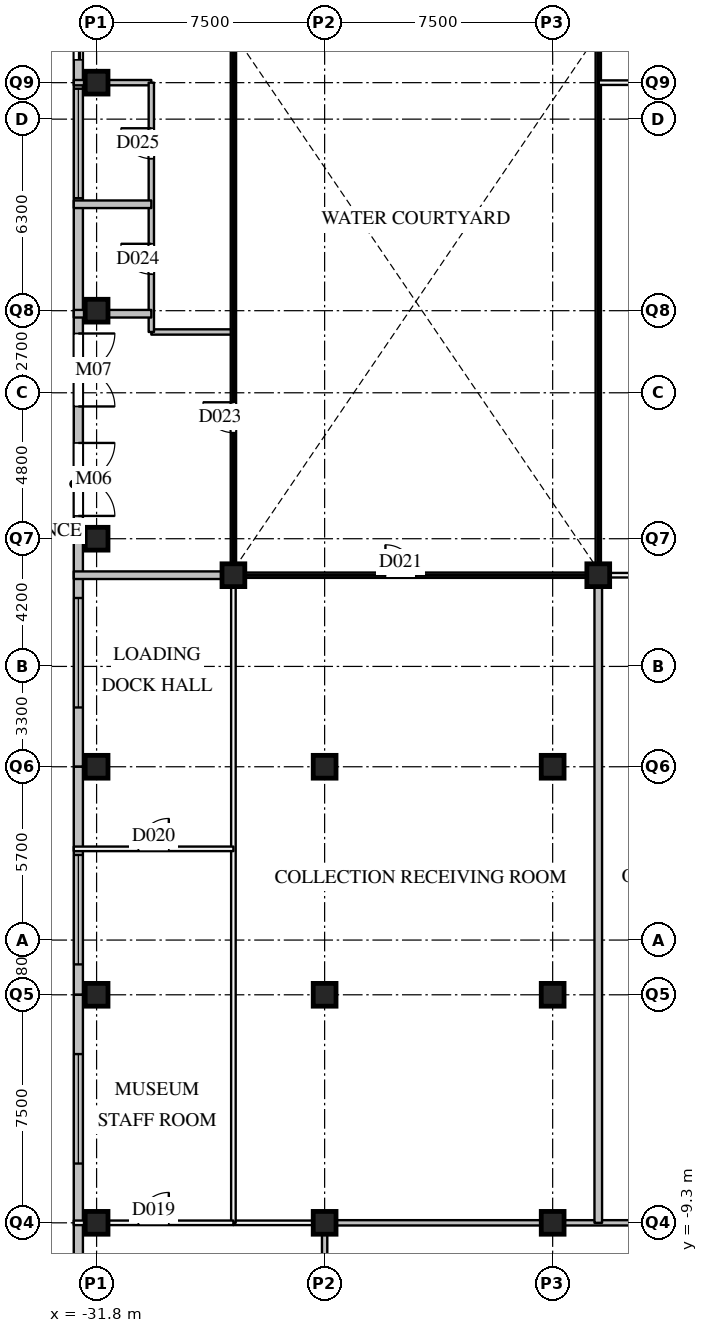
"""IFC4 building model, lengths in metres.
Left out: names, types, materials, properties, quantities, classifications, styles, units other than length and angle.
Written with IfcOpenShell. Run it as: python <this file> out.ifc"""

import sys

from ifc_helpers import new_model, si_unit, direction, frame, frame_2d, origin, origin_2d, place, context, subcontext, project, spatial, rectangle, extrude, element, fill, save


model = new_model("IFC4")
c1 = context("Model", 3, precision=1e-05, world=origin(), true_north=direction((0.0, 1.0)))
c2 = subcontext(c1, "Body", "Model", "MODEL_VIEW")
j1 = project(units=[si_unit("LENGTHUNIT", "METRE"), si_unit("PLANEANGLEUNIT", "RADIAN")], contexts=[c1])
p1 = place(None, origin())
s1 = spatial("IfcSite", under=j1, at=p1, CompositionType="ELEMENT")
p2 = place(p1, origin())
s2 = spatial("IfcBuilding", under=s1, at=p2, CompositionType="ELEMENT")
p3 = place(p2, origin())
s3 = spatial("IfcBuildingStorey", under=s2, at=p3, CompositionType="ELEMENT", Elevation=0.0)
for number, where, z_axis, x_axis in (
    (1, (-31.8, -9.3, 0.0), (0.0, 0.0, 1.0), (1.0, 0.0, 0.0)),
    (2, (-31.8, -1.8, 0.0), (0.0, 0.0, 1.0), (1.0, 0.0, 0.0)),
    (3, (-31.8, 5.7, 0.0), (0.0, 0.0, 1.0), (1.0, 0.0, 0.0)),
    (4, (-31.8, 13.2, 0.0), (0.0, 0.0, 1.0), (1.0, 0.0, 0.0)),
    (5, (-31.8, 20.7, 0.0), (0.0, 0.0, 1.0), (1.0, 0.0, 0.0)),
    (6, (-31.8, 28.2, 0.0), (0.0, 0.0, 1.0), (1.0, 0.0, 0.0)),
    (7, (-24.3, -9.3, 0.0), (0.0, 0.0, 1.0), (1.0, 0.0, 0.0)),
    (8, (-24.3, -1.8, 0.0), (0.0, 0.0, 1.0), (1.0, 0.0, 0.0)),
    (9, (-24.3, 5.7, 0.0), (0.0, 0.0, 1.0), (1.0, 0.0, 0.0)),
    (10, (-16.8, -9.3, 0.0), (0.0, 0.0, 1.0), (1.0, 0.0, 0.0)),
    (11, (-16.8, -1.8, 0.0), (0.0, 0.0, 1.0), (1.0, 0.0, 0.0)),
    (12, (-16.8, 5.7, 0.0), (0.0, 0.0, 1.0), (1.0, 0.0, 0.0)),
    (13, (-27.3, 12.0, 0.0), (0.0, 0.0, 1.0), (1.0, 0.0, 0.0)),
    (14, (-15.3, 12.0, 0.0), (0.0, 0.0, 1.0), (1.0, 0.0, 0.0)),
):
    element("IfcColumn", number, at=place(p3, frame(where, z_axis=z_axis, x_axis=x_axis)), inside=s3, PredefinedType="COLUMN", context=c2, shape_type="SweptSolid", body=[
        extrude(rectangle(XDim=0.75, YDim=0.75, at=origin_2d()), origin(), (0.0, 0.0, 1.0), 8.0),
    ])
p4 = place(p3, frame((-32.4, 35.7, 0.0), z_axis=(0.0, 0.0, 1.0), x_axis=(0.0, -1.0, 0.0)))
e15 = element("IfcWall", 15, at=p4, inside=s3, PredefinedType="SOLIDWALL", context=c2, shape_type="SweptSolid", body=[
    extrude(rectangle(XDim=7.5, YDim=0.3, at=frame_2d((3.75, 0.0))), origin(), (0.0, 0.0, 1.0), 7.59),
])
p5 = place(p4, frame((4.35, 0.0, 0.0)))
e16 = element("IfcOpeningElement", 16, at=p5, cuts=e15, PredefinedType="OPENING", context=c2, shape_type="SweptSolid", body=[
    extrude(rectangle(XDim=2.4, YDim=2.4, at=frame_2d((1.2, 1.2))), frame((0.0, 0.16, 0.0), z_axis=(0.0, -1.0, 0.0), x_axis=(1.0, 0.0, 0.0)), (0.0, 0.0, 1.0), 0.32),
])
p6 = place(p4, frame((0.75, 0.0, 0.0)))
e17 = element("IfcOpeningElement", 17, at=p6, cuts=e15, PredefinedType="OPENING", context=c2, shape_type="SweptSolid", body=[
    extrude(rectangle(XDim=2.4, YDim=2.4, at=frame_2d((1.2, 1.2))), frame((0.0, 0.16, 0.0), z_axis=(0.0, -1.0, 0.0), x_axis=(1.0, 0.0, 0.0)), (0.0, 0.0, 1.0), 0.32),
])
p7 = place(p3, frame((-32.4, 28.2, 0.0), z_axis=(0.0, 0.0, 1.0), x_axis=(0.0, -1.0, 0.0)))
e18 = element("IfcWall", 18, at=p7, inside=s3, PredefinedType="SOLIDWALL", context=c2, shape_type="SweptSolid", body=[
    extrude(rectangle(XDim=7.5, YDim=0.3, at=frame_2d((3.75, 0.0))), origin(), (0.0, 0.0, 1.0), 7.59),
])
p8 = place(p7, frame((0.2, 0.0, 0.9)))
e19 = element("IfcOpeningElement", 19, at=p8, cuts=e18, PredefinedType="OPENING", context=c2, shape_type="SweptSolid", body=[
    extrude(rectangle(XDim=3.6, YDim=3.0, at=frame_2d((1.8, 1.5))), frame((0.0, 0.16, 0.0), z_axis=(0.0, -1.0, 0.0), x_axis=(1.0, 0.0, 0.0)), (0.0, 0.0, 1.0), 0.32),
])
p9 = place(p3, frame((-32.4, 20.7, 0.0), z_axis=(0.0, 0.0, 1.0), x_axis=(0.0, -1.0, 0.0)))
e20 = element("IfcWall", 20, at=p9, inside=s3, PredefinedType="SOLIDWALL", context=c2, shape_type="SweptSolid", body=[
    extrude(rectangle(XDim=7.5, YDim=0.3, at=frame_2d((3.75, 0.0))), origin(), (0.0, 0.0, 1.0), 7.59),
])
p10 = place(p9, frame((4.35, 0.0, 0.0)))
e21 = element("IfcOpeningElement", 21, at=p10, cuts=e20, PredefinedType="OPENING", context=c2, shape_type="SweptSolid", body=[
    extrude(rectangle(XDim=2.4, YDim=2.7, at=frame_2d((1.2, 1.35))), frame((0.0, 0.16, 0.0), z_axis=(0.0, -1.0, 0.0), x_axis=(1.0, 0.0, 0.0)), (0.0, 0.0, 1.0), 0.32),
])
p11 = place(p9, frame((0.75, 0.0, 0.0)))
e22 = element("IfcOpeningElement", 22, at=p11, cuts=e20, PredefinedType="OPENING", context=c2, shape_type="SweptSolid", body=[
    extrude(rectangle(XDim=2.4, YDim=2.7, at=frame_2d((1.2, 1.35))), frame((0.0, 0.16, 0.0), z_axis=(0.0, -1.0, 0.0), x_axis=(1.0, 0.0, 0.0)), (0.0, 0.0, 1.0), 0.32),
])
p12 = place(p3, frame((-32.4, 13.2, 0.0), z_axis=(0.0, 0.0, 1.0), x_axis=(0.0, -1.0, 0.0)))
e23 = element("IfcWall", 23, at=p12, inside=s3, PredefinedType="SOLIDWALL", context=c2, shape_type="SweptSolid", body=[
    extrude(rectangle(XDim=7.5, YDim=0.3, at=frame_2d((3.75, 0.0))), origin(), (0.0, 0.0, 1.0), 7.59),
])
p13 = place(p12, frame((1.95, 0.0, 0.9)))
e24 = element("IfcOpeningElement", 24, at=p13, cuts=e23, PredefinedType="OPENING", context=c2, shape_type="SweptSolid", body=[
    extrude(rectangle(XDim=3.6, YDim=3.0, at=frame_2d((1.8, 1.5))), frame((0.0, 0.16, 0.0), z_axis=(0.0, -1.0, 0.0), x_axis=(1.0, 0.0, 0.0)), (0.0, 0.0, 1.0), 0.32),
])
p14 = place(p3, frame((-32.4, 5.7, 0.0), z_axis=(0.0, 0.0, 1.0), x_axis=(0.0, -1.0, 0.0)))
e25 = element("IfcWall", 25, at=p14, inside=s3, PredefinedType="SOLIDWALL", context=c2, shape_type="SweptSolid", body=[
    extrude(rectangle(XDim=7.5, YDim=0.3, at=frame_2d((3.75, 0.0))), origin(), (0.0, 0.0, 1.0), 7.59),
])
p15 = place(p14, frame((2.9, 0.0, 0.9)))
e26 = element("IfcOpeningElement", 26, at=p15, cuts=e25, PredefinedType="OPENING", context=c2, shape_type="SweptSolid", body=[
    extrude(rectangle(XDim=3.6, YDim=3.0, at=frame_2d((1.8, 1.5))), frame((0.0, 0.16, 0.0), z_axis=(0.0, -1.0, 0.0), x_axis=(1.0, 0.0, 0.0)), (0.0, 0.0, 1.0), 0.32),
])
p16 = place(p3, frame((-32.4, -1.8, 0.0), z_axis=(0.0, 0.0, 1.0), x_axis=(0.0, -1.0, 0.0)))
e27 = element("IfcWall", 27, at=p16, inside=s3, PredefinedType="SOLIDWALL", context=c2, shape_type="SweptSolid", body=[
    extrude(rectangle(XDim=7.5, YDim=0.3, at=frame_2d((3.75, 0.0))), origin(), (0.0, 0.0, 1.0), 7.59),
])
p17 = place(p16, frame((1.95, 0.0, 0.9)))
e28 = element("IfcOpeningElement", 28, at=p17, cuts=e27, PredefinedType="OPENING", context=c2, shape_type="SweptSolid", body=[
    extrude(rectangle(XDim=3.6, YDim=3.0, at=frame_2d((1.8, 1.5))), frame((0.0, 0.16, 0.0), z_axis=(0.0, -1.0, 0.0), x_axis=(1.0, 0.0, 0.0)), (0.0, 0.0, 1.0), 0.32),
])
p18 = place(p3, frame((-32.4, -9.3, 0.0), z_axis=(0.0, 0.0, 1.0), x_axis=(0.0, -1.0, 0.0)))
e29 = element("IfcWall", 29, at=p18, inside=s3, PredefinedType="SOLIDWALL", context=c2, shape_type="SweptSolid", body=[
    extrude(rectangle(XDim=7.5, YDim=0.3, at=frame_2d((3.75, 0.0))), origin(), (0.0, 0.0, 1.0), 7.59),
])
p19 = place(p18, frame((1.95, 0.0, 0.9)))
e30 = element("IfcOpeningElement", 30, at=p19, cuts=e29, PredefinedType="OPENING", context=c2, shape_type="SweptSolid", body=[
    extrude(rectangle(XDim=3.6, YDim=3.0, at=frame_2d((1.8, 1.5))), frame((0.0, 0.16, 0.0), z_axis=(0.0, -1.0, 0.0), x_axis=(1.0, 0.0, 0.0)), (0.0, 0.0, 1.0), 0.32),
])
p20 = place(p3, frame((-24.3, -9.3, 0.0), z_axis=(0.0, 0.0, 1.0), x_axis=(1.0, 0.0, 0.0)))
e31 = element("IfcWall", 31, at=p20, inside=s3, PredefinedType="PARTITIONING", context=c2, shape_type="SweptSolid", body=[
    extrude(rectangle(XDim=15.0, YDim=0.175, at=frame_2d((7.5, 0.0))), origin(), (0.0, 0.0, 1.0), 6.79),
])
p21 = place(p20, frame((11.1, 0.0, 0.0)))
e32 = element("IfcOpeningElement", 32, at=p21, cuts=e31, PredefinedType="OPENING", context=c2, shape_type="SweptSolid", body=[
    extrude(rectangle(XDim=1.8, YDim=2.1, at=frame_2d((0.9, 1.05))), frame((0.0, 0.097, 0.0), z_axis=(0.0, -1.0, 0.0), x_axis=(1.0, 0.0, 0.0)), (0.0, 0.0, 1.0), 0.195),
])
p22 = place(p3, frame((-27.3, 12.0, 0.0), z_axis=(0.0, 0.0, 1.0), x_axis=(1.0, 0.0, 0.0)))
e33 = element("IfcWall", 33, at=p22, inside=s3, PredefinedType="PARTITIONING", context=c2, shape_type="SweptSolid", body=[
    extrude(rectangle(XDim=12.0, YDim=0.175, at=frame_2d((6.0, 0.0))), origin(), (0.0, 0.0, 1.0), 7.59),
])
p23 = place(p22, frame((5.0, 0.0, 0.0)))
e34 = element("IfcOpeningElement", 34, at=p23, cuts=e33, PredefinedType="OPENING", context=c2, shape_type="SweptSolid", body=[
    extrude(rectangle(XDim=1.0, YDim=2.1, at=frame_2d((0.5, 1.05))), frame((0.0, 0.097, 0.0), z_axis=(0.0, -1.0, 0.0), x_axis=(1.0, 0.0, 0.0)), (0.0, 0.0, 1.0), 0.195),
])
p24 = place(p3, frame((-30.0, 20.0, 0.0), z_axis=(0.0, 0.0, 1.0), x_axis=(1.0, 0.0, 0.0)))
e35 = element("IfcWall", 35, at=p24, inside=s3, PredefinedType="PARTITIONING", context=c2, shape_type="SweptSolid", body=[
    extrude(rectangle(XDim=2.7, YDim=0.175, at=frame_2d((1.35, 0.0))), origin(), (0.0, 0.0, 1.0), 7.59),
])
p25 = place(p3, frame((-32.55, 28.2, 0.0), z_axis=(0.0, 0.0, 1.0), x_axis=(1.0, 0.0, 0.0)))
e36 = element("IfcWall", 36, at=p25, inside=s3, PredefinedType="PARTITIONING", context=c2, shape_type="SweptSolid", body=[
    extrude(rectangle(XDim=2.55, YDim=0.175, at=frame_2d((1.275, 0.0))), origin(), (0.0, 0.0, 1.0), 7.59),
])
p26 = place(p3, frame((-30.0, 20.0, 0.0), z_axis=(0.0, 0.0, 1.0), x_axis=(0.0, 1.0, 0.0)))
e37 = element("IfcWall", 37, at=p26, inside=s3, PredefinedType="PARTITIONING", context=c2, shape_type="SweptSolid", body=[
    extrude(rectangle(XDim=8.2, YDim=0.175, at=frame_2d((4.1, 0.0))), origin(), (0.0, 0.0, 1.0), 7.59),
])
p27 = place(p26, frame((1.9, 0.0, 0.0)))
e38 = element("IfcOpeningElement", 38, at=p27, cuts=e37, PredefinedType="OPENING", context=c2, shape_type="SweptSolid", body=[
    extrude(rectangle(XDim=1.0, YDim=2.1, at=frame_2d((0.5, 1.05))), frame((0.0, 0.097, 0.0), z_axis=(0.0, -1.0, 0.0), x_axis=(1.0, 0.0, 0.0)), (0.0, 0.0, 1.0), 0.195),
])
p28 = place(p26, frame((5.7, 0.0, 0.0)))
e39 = element("IfcOpeningElement", 39, at=p28, cuts=e37, PredefinedType="OPENING", context=c2, shape_type="SweptSolid", body=[
    extrude(rectangle(XDim=1.0, YDim=2.1, at=frame_2d((0.5, 1.05))), frame((0.0, 0.097, 0.0), z_axis=(0.0, -1.0, 0.0), x_axis=(1.0, 0.0, 0.0)), (0.0, 0.0, 1.0), 0.195),
])
p29 = place(p3, frame((-27.3, 12.0, 0.0), z_axis=(0.0, 0.0, 1.0), x_axis=(0.0, 1.0, 0.0)))
e40 = element("IfcWall", 40, at=p29, inside=s3, PredefinedType="PARTITIONING", context=c2, shape_type="SweptSolid", body=[
    extrude(rectangle(XDim=35.35, YDim=0.175, at=frame_2d((17.675, 0.0))), origin(), (0.0, 0.0, 1.0), 6.79),
])
p30 = place(p29, frame((18.4, 0.0, 0.0)))
e41 = element("IfcOpeningElement", 41, at=p30, cuts=e40, PredefinedType="OPENING", context=c2, shape_type="SweptSolid", body=[
    extrude(rectangle(XDim=1.8, YDim=2.1, at=frame_2d((0.9, 1.05))), frame((0.0, 0.097, 0.0), z_axis=(0.0, -1.0, 0.0), x_axis=(1.0, 0.0, 0.0)), (0.0, 0.0, 1.0), 0.195),
])
p31 = place(p29, frame((23.7, 0.0, 0.0)))
e42 = element("IfcOpeningElement", 42, at=p31, cuts=e40, PredefinedType="OPENING", context=c2, shape_type="SweptSolid", body=[
    extrude(rectangle(XDim=1.8, YDim=2.1, at=frame_2d((0.9, 1.05))), frame((0.0, 0.097, 0.0), z_axis=(0.0, -1.0, 0.0), x_axis=(1.0, 0.0, 0.0)), (0.0, 0.0, 1.0), 0.195),
])
p32 = place(p29, frame((4.688, 0.0, 0.0)))
e43 = element("IfcOpeningElement", 43, at=p32, cuts=e40, PredefinedType="OPENING", context=c2, shape_type="SweptSolid", body=[
    extrude(rectangle(XDim=1.0, YDim=2.1, at=frame_2d((0.5, 1.05))), frame((0.0, 0.097, 0.0), z_axis=(0.0, -1.0, 0.0), x_axis=(1.0, 0.0, 0.0)), (0.0, 0.0, 1.0), 0.195),
])
p33 = place(p3, frame((-24.3, -20.95, 0.0), z_axis=(0.0, 0.0, 1.0), x_axis=(0.0, 1.0, 0.0)))
e44 = element("IfcWall", 44, at=p33, inside=s3, PredefinedType="PARTITIONING", context=c2, shape_type="SweptSolid", body=[
    extrude(rectangle(XDim=11.65, YDim=0.175, at=frame_2d((5.825, 0.0))), origin(), (0.0, 0.0, 1.0), 6.79),
])
p34 = place(p33, frame((5.325, 0.0, 0.0)))
e45 = element("IfcOpeningElement", 45, at=p34, cuts=e44, PredefinedType="OPENING", context=c2, shape_type="SweptSolid", body=[
    extrude(rectangle(XDim=1.0, YDim=2.1, at=frame_2d((0.5, 1.05))), frame((0.0, 0.097, 0.0), z_axis=(0.0, -1.0, 0.0), x_axis=(1.0, 0.0, 0.0)), (0.0, 0.0, 1.0), 0.195),
])
p35 = place(p3, frame((-15.3, 12.0, 0.0), z_axis=(0.0, 0.0, 1.0), x_axis=(0.0, 1.0, 0.0)))
e46 = element("IfcWall", 46, at=p35, inside=s3, PredefinedType="PARTITIONING", context=c2, shape_type="SweptSolid", body=[
    extrude(rectangle(XDim=18.0, YDim=0.175, at=frame_2d((9.0, 0.0))), origin(), (0.0, 0.0, 1.0), 7.59),
])
p36 = place(p3, frame((-27.3, -9.3, 0.0), z_axis=(0.0, 0.0, 1.0), x_axis=(1.0, 0.0, 0.0)))
e47 = element("IfcWall", 47, at=p36, inside=s3, PredefinedType="PARTITIONING", context=c2, shape_type="SweptSolid", body=[
    extrude(rectangle(XDim=3.0, YDim=0.15, at=frame_2d((1.5, 0.0))), origin(), (0.0, 0.0, 1.0), 6.79),
])
for number, where, z_axis, x_axis in (
    (48, (-15.3, 12.0, 0.0), (0.0, 0.0, 1.0), (1.0, 0.0, 0.0)),
    (49, (-15.3, 28.2, 0.0), (0.0, 0.0, 1.0), (1.0, 0.0, 0.0)),
):
    element("IfcWall", number, at=place(p3, frame(where, z_axis=z_axis, x_axis=x_axis)), inside=s3, PredefinedType="PARTITIONING", context=c2, shape_type="SweptSolid", body=[
        extrude(rectangle(XDim=11.25, YDim=0.15, at=frame_2d((5.625, 0.0))), origin(), (0.0, 0.0, 1.0), 6.79),
    ])
p37 = place(p3, frame((-27.3, -9.3, 0.0), z_axis=(0.0, 0.0, 1.0), x_axis=(0.0, 1.0, 0.0)))
e50 = element("IfcWall", 50, at=p37, inside=s3, PredefinedType="PARTITIONING", context=c2, shape_type="SweptSolid", body=[
    extrude(rectangle(XDim=21.3, YDim=0.15, at=frame_2d((10.65, 0.0))), origin(), (0.0, 0.0, 1.0), 6.79),
])
p38 = place(p3, frame((-32.55, -9.3, 0.0), z_axis=(0.0, 0.0, 1.0), x_axis=(1.0, 0.0, 0.0)))
e51 = element("IfcWall", 51, at=p38, inside=s3, PredefinedType="PARTITIONING", context=c2, shape_type="SweptSolid", body=[
    extrude(rectangle(XDim=5.25, YDim=0.15, at=frame_2d((2.625, 0.0))), origin(), (0.0, 0.0, 1.0), 6.79),
])
p39 = place(p38, frame((2.125, 0.0, 0.0)))
e52 = element("IfcOpeningElement", 52, at=p39, cuts=e51, PredefinedType="OPENING", context=c2, shape_type="SweptSolid", body=[
    extrude(rectangle(XDim=1.0, YDim=2.1, at=frame_2d((0.5, 1.05))), frame((0.0, 0.085, 0.0), z_axis=(0.0, -1.0, 0.0), x_axis=(1.0, 0.0, 0.0)), (0.0, 0.0, 1.0), 0.17),
])
p40 = place(p3, frame((-32.55, 3.0, 0.0), z_axis=(0.0, 0.0, 1.0), x_axis=(1.0, 0.0, 0.0)))
e53 = element("IfcWall", 53, at=p40, inside=s3, PredefinedType="PARTITIONING", context=c2, shape_type="SweptSolid", body=[
    extrude(rectangle(XDim=5.25, YDim=0.15, at=frame_2d((2.625, 0.0))), origin(), (0.0, 0.0, 1.0), 6.79),
])
p41 = place(p40, frame((2.125, 0.0, 0.0)))
e54 = element("IfcOpeningElement", 54, at=p41, cuts=e53, PredefinedType="OPENING", context=c2, shape_type="SweptSolid", body=[
    extrude(rectangle(XDim=1.0, YDim=2.1, at=frame_2d((0.5, 1.05))), frame((0.0, 0.085, 0.0), z_axis=(0.0, -1.0, 0.0), x_axis=(1.0, 0.0, 0.0)), (0.0, 0.0, 1.0), 0.17),
])
p42 = place(p3, frame((-32.55, 12.0, 0.0), z_axis=(0.0, 0.0, 1.0), x_axis=(1.0, 0.0, 0.0)))
e55 = element("IfcWall", 55, at=p42, inside=s3, PredefinedType="PARTITIONING", context=c2, shape_type="SweptSolid", body=[
    extrude(rectangle(XDim=5.25, YDim=0.25, at=frame_2d((2.625, 0.0))), origin(), (0.0, 0.0, 1.0), 6.79),
])
p43 = place(p3, frame((-32.55, 20.6, 0.0), z_axis=(0.0, 0.0, 1.0), x_axis=(1.0, 0.0, 0.0)))
e56 = element("IfcWall", 56, at=p43, inside=s3, PredefinedType="PARTITIONING", context=c2, shape_type="SweptSolid", body=[
    extrude(rectangle(XDim=2.55, YDim=0.25, at=frame_2d((1.275, 0.0))), origin(), (0.0, 0.0, 1.0), 7.59),
])
p44 = place(p3, frame((-32.55, 24.2, 0.0), z_axis=(0.0, 0.0, 1.0), x_axis=(1.0, 0.0, 0.0)))
e57 = element("IfcWall", 57, at=p44, inside=s3, PredefinedType="PARTITIONING", context=c2, shape_type="SweptSolid", body=[
    extrude(rectangle(XDim=2.55, YDim=0.25, at=frame_2d((1.275, 0.0))), origin(), (0.0, 0.0, 1.0), 6.79),
])
p45 = place(p3, frame((-15.3, -9.3, 0.0), z_axis=(0.0, 0.0, 1.0), x_axis=(0.0, 1.0, 0.0)))
e58 = element("IfcWall", 58, at=p45, inside=s3, PredefinedType="PARTITIONING", context=c2, shape_type="SweptSolid", body=[
    extrude(rectangle(XDim=21.3, YDim=0.25, at=frame_2d((10.65, 0.0))), origin(), (0.0, 0.0, 1.0), 6.79),
])
p46 = place(p5, origin())
e59 = element("IfcDoor", 59, at=p46, inside=s3, OperationType="SLIDING_TO_LEFT", PredefinedType="DOOR", context=c2, shape_type="SweptSolid", body=[
    extrude(rectangle(XDim=2.4, YDim=2.4, at=frame_2d((1.2, 1.2))), frame((0.0, 0.025, 0.0), z_axis=(0.0, -1.0, 0.0), x_axis=(1.0, 0.0, 0.0)), (0.0, 0.0, 1.0), 0.05),
])
fill(e16, e59)
p47 = place(p8, origin())
e60 = element("IfcWindow", 60, at=p47, inside=s3, PartitioningType="SINGLE_PANEL", PredefinedType="WINDOW", context=c2, shape_type="SweptSolid", body=[
    extrude(rectangle(XDim=3.6, YDim=3.0, at=frame_2d((1.8, 1.5))), frame((0.0, 0.03, 0.0), z_axis=(0.0, -1.0, 0.0), x_axis=(1.0, 0.0, 0.0)), (0.0, 0.0, 1.0), 0.06),
])
fill(e19, e60)
p48 = place(p10, origin())
e61 = element("IfcDoor", 61, at=p48, inside=s3, OperationType="DOUBLE_DOOR_SINGLE_SWING", PredefinedType="DOOR", context=c2, shape_type="SweptSolid", body=[
    extrude(rectangle(XDim=2.4, YDim=2.7, at=frame_2d((1.2, 1.35))), frame((0.0, 0.025, 0.0), z_axis=(0.0, -1.0, 0.0), x_axis=(1.0, 0.0, 0.0)), (0.0, 0.0, 1.0), 0.05),
])
fill(e21, e61)
p49 = place(p11, origin())
e62 = element("IfcDoor", 62, at=p49, inside=s3, OperationType="DOUBLE_DOOR_SINGLE_SWING", PredefinedType="DOOR", context=c2, shape_type="SweptSolid", body=[
    extrude(rectangle(XDim=2.4, YDim=2.7, at=frame_2d((1.2, 1.35))), frame((0.0, 0.025, 0.0), z_axis=(0.0, -1.0, 0.0), x_axis=(1.0, 0.0, 0.0)), (0.0, 0.0, 1.0), 0.05),
])
fill(e22, e62)
p50 = place(p13, origin())
e63 = element("IfcWindow", 63, at=p50, inside=s3, PartitioningType="SINGLE_PANEL", PredefinedType="WINDOW", context=c2, shape_type="SweptSolid", body=[
    extrude(rectangle(XDim=3.6, YDim=3.0, at=frame_2d((1.8, 1.5))), frame((0.0, 0.03, 0.0), z_axis=(0.0, -1.0, 0.0), x_axis=(1.0, 0.0, 0.0)), (0.0, 0.0, 1.0), 0.06),
])
fill(e24, e63)
p51 = place(p15, origin())
e64 = element("IfcWindow", 64, at=p51, inside=s3, PartitioningType="SINGLE_PANEL", PredefinedType="WINDOW", context=c2, shape_type="SweptSolid", body=[
    extrude(rectangle(XDim=3.6, YDim=3.0, at=frame_2d((1.8, 1.5))), frame((0.0, 0.03, 0.0), z_axis=(0.0, -1.0, 0.0), x_axis=(1.0, 0.0, 0.0)), (0.0, 0.0, 1.0), 0.06),
])
fill(e26, e64)
p52 = place(p17, origin())
e65 = element("IfcWindow", 65, at=p52, inside=s3, PartitioningType="SINGLE_PANEL", PredefinedType="WINDOW", context=c2, shape_type="SweptSolid", body=[
    extrude(rectangle(XDim=3.6, YDim=3.0, at=frame_2d((1.8, 1.5))), frame((0.0, 0.03, 0.0), z_axis=(0.0, -1.0, 0.0), x_axis=(1.0, 0.0, 0.0)), (0.0, 0.0, 1.0), 0.06),
])
fill(e28, e65)
p53 = place(p39, origin())
e66 = element("IfcDoor", 66, at=p53, inside=s3, OperationType="SINGLE_SWING_RIGHT", PredefinedType="DOOR", context=c2, shape_type="SweptSolid", body=[
    extrude(rectangle(XDim=1.0, YDim=2.1, at=frame_2d((0.5, 1.05))), frame((0.0, 0.025, 0.0), z_axis=(0.0, -1.0, 0.0), x_axis=(1.0, 0.0, 0.0)), (0.0, 0.0, 1.0), 0.05),
])
fill(e52, e66)
p54 = place(p41, origin())
e67 = element("IfcDoor", 67, at=p54, inside=s3, OperationType="SINGLE_SWING_RIGHT", PredefinedType="DOOR", context=c2, shape_type="SweptSolid", body=[
    extrude(rectangle(XDim=1.0, YDim=2.1, at=frame_2d((0.5, 1.05))), frame((0.0, 0.025, 0.0), z_axis=(0.0, -1.0, 0.0), x_axis=(1.0, 0.0, 0.0)), (0.0, 0.0, 1.0), 0.05),
])
fill(e54, e67)
p55 = place(p23, origin())
e68 = element("IfcDoor", 68, at=p55, inside=s3, OperationType="SINGLE_SWING_LEFT", PredefinedType="DOOR", context=c2, shape_type="SweptSolid", body=[
    extrude(rectangle(XDim=1.0, YDim=2.1, at=frame_2d((0.5, 1.05))), frame((0.0, 0.025, 0.0), z_axis=(0.0, -1.0, 0.0), x_axis=(1.0, 0.0, 0.0)), (0.0, 0.0, 1.0), 0.05),
])
fill(e34, e68)
p56 = place(p32, origin())
e69 = element("IfcDoor", 69, at=p56, inside=s3, OperationType="SINGLE_SWING_RIGHT", PredefinedType="DOOR", context=c2, shape_type="SweptSolid", body=[
    extrude(rectangle(XDim=1.0, YDim=2.1, at=frame_2d((0.5, 1.05))), frame((0.0, 0.025, 0.0), z_axis=(0.0, -1.0, 0.0), x_axis=(1.0, 0.0, 0.0)), (0.0, 0.0, 1.0), 0.05),
])
fill(e43, e69)
p57 = place(p27, origin())
e70 = element("IfcDoor", 70, at=p57, inside=s3, OperationType="SINGLE_SWING_RIGHT", PredefinedType="DOOR", context=c2, shape_type="SweptSolid", body=[
    extrude(rectangle(XDim=1.0, YDim=2.1, at=frame_2d((0.5, 1.05))), frame((0.0, 0.025, 0.0), z_axis=(0.0, -1.0, 0.0), x_axis=(1.0, 0.0, 0.0)), (0.0, 0.0, 1.0), 0.05),
])
fill(e38, e70)
p58 = place(p28, origin())
e71 = element("IfcDoor", 71, at=p58, inside=s3, OperationType="SINGLE_SWING_RIGHT", PredefinedType="DOOR", context=c2, shape_type="SweptSolid", body=[
    extrude(rectangle(XDim=1.0, YDim=2.1, at=frame_2d((0.5, 1.05))), frame((0.0, 0.025, 0.0), z_axis=(0.0, -1.0, 0.0), x_axis=(1.0, 0.0, 0.0)), (0.0, 0.0, 1.0), 0.05),
])
fill(e39, e71)
save(model, sys.argv[1])
